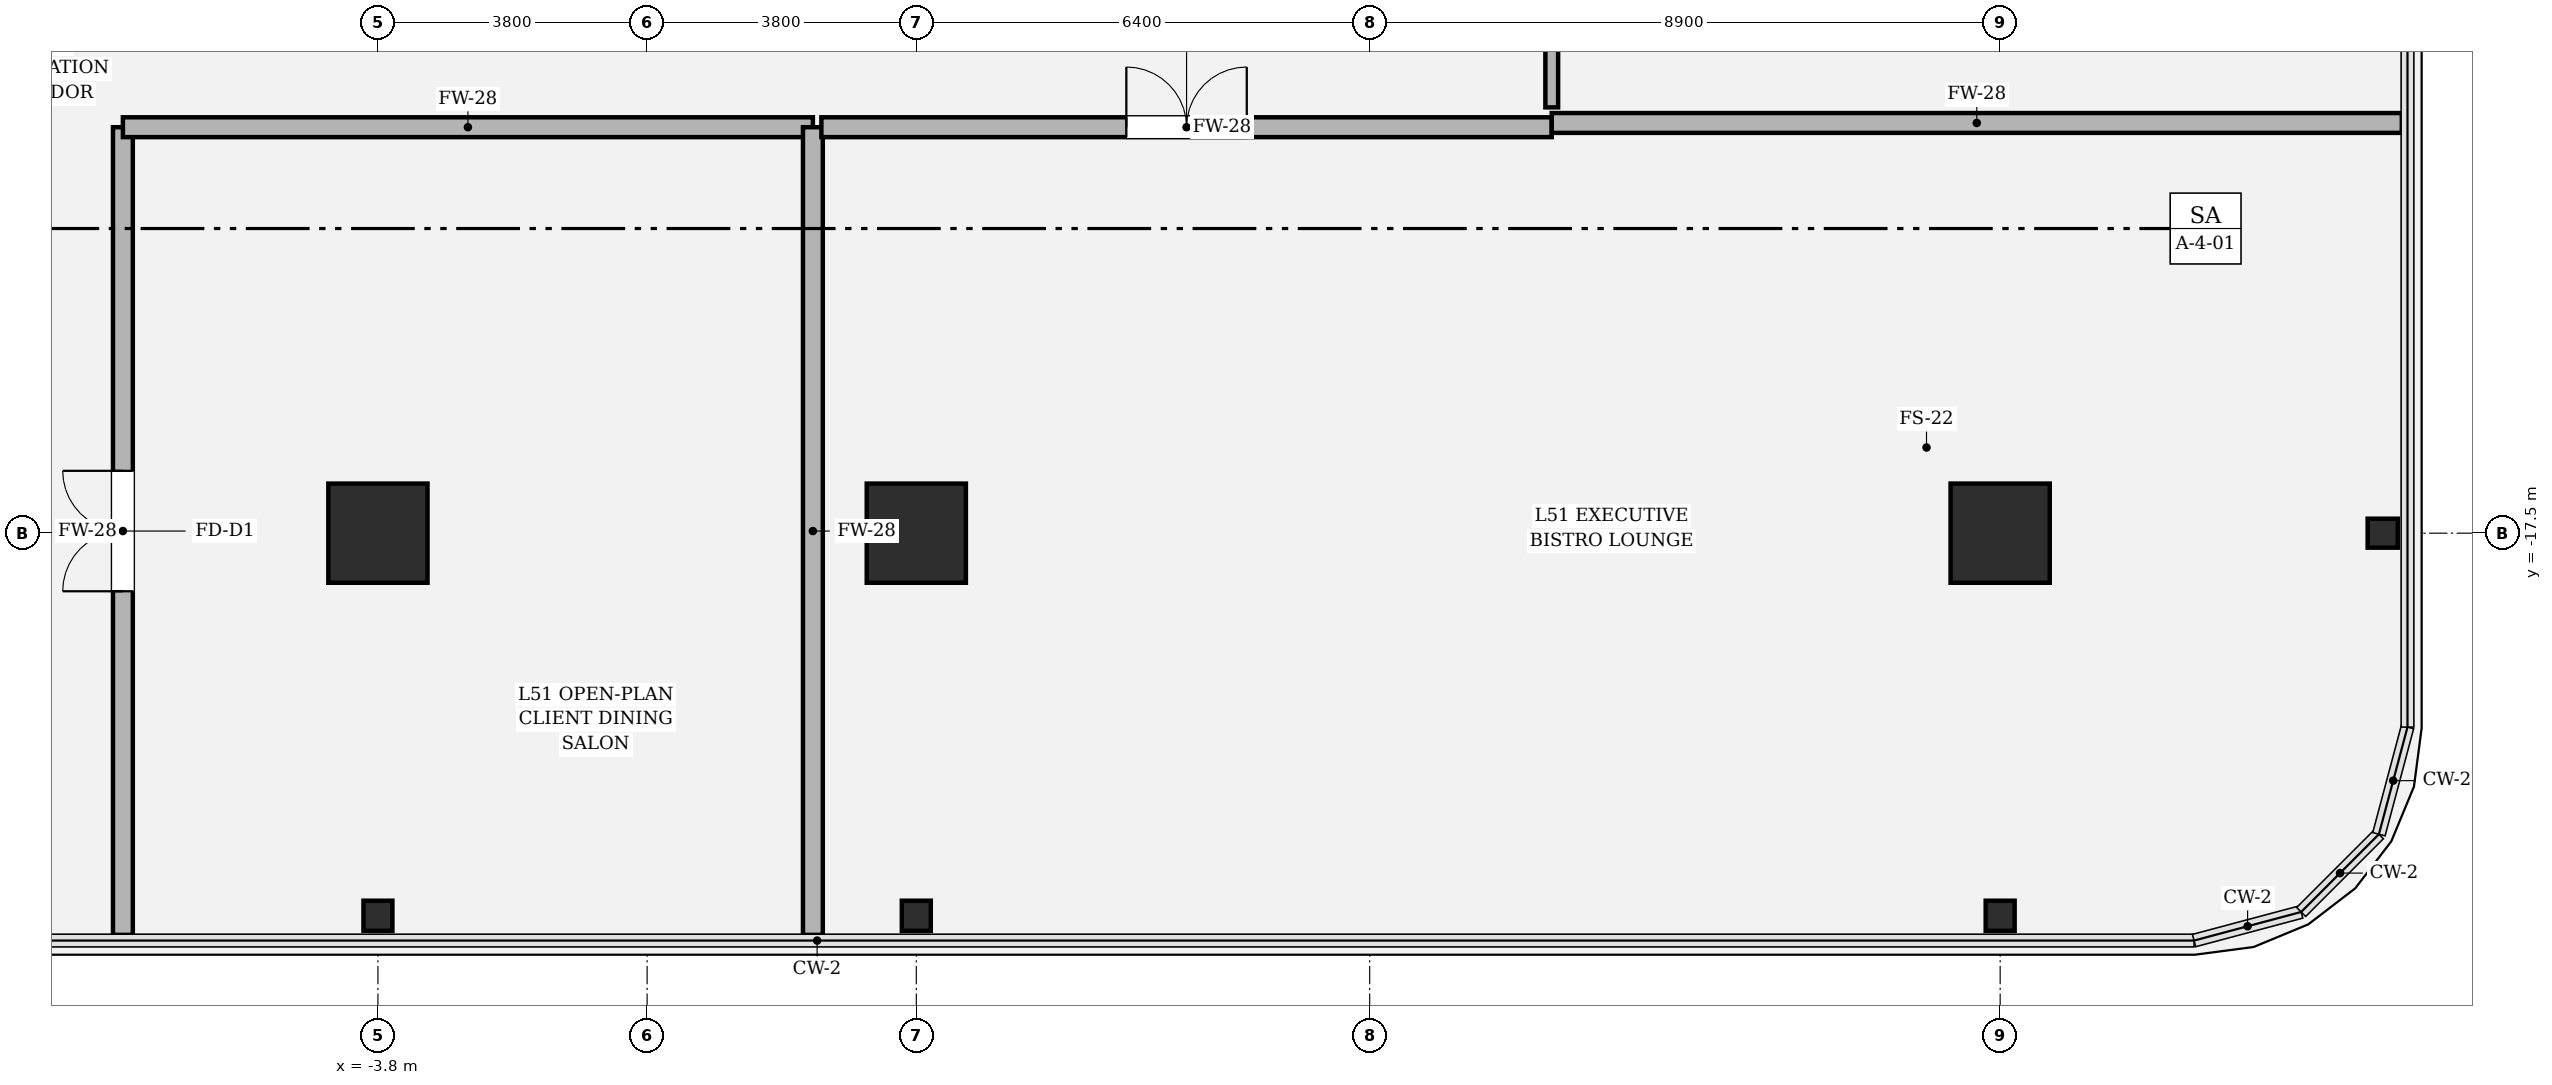
"""IFC4 building model, lengths in metres.
Left out: names, types, materials, properties, quantities, classifications, styles, units other than length and angle.
Written with IfcOpenShell. Run it as: python <this file> out.ifc"""

import sys

from ifc_helpers import new_model, si_unit, direction, frame, frame_2d, origin, origin_2d, place, context, subcontext, project, spatial, rectangle, hollow_rectangle, i_section, extrude, element, fill, save


model = new_model("IFC4")
c1 = context("Model", 3, precision=1e-05, world=origin(), true_north=direction((0.0, 1.0)))
c2 = subcontext(c1, "Body", "Model", "MODEL_VIEW")
j1 = project(units=[si_unit("LENGTHUNIT", "METRE"), si_unit("PLANEANGLEUNIT", "RADIAN")], contexts=[c1])
p1 = place(None, origin())
s1 = spatial("IfcSite", under=j1, at=p1, CompositionType="ELEMENT")
p2 = place(p1, origin())
s2 = spatial("IfcBuilding", under=s1, at=p2, CompositionType="ELEMENT")
p3 = place(p2, frame((0.0, 0.0, 216.75)))
s3 = spatial("IfcBuildingStorey", under=s2, at=p3, CompositionType="ELEMENT", Elevation=216.75)
for number, where, z_axis, x_axis in (
    (1, (-3.8, -17.5, 0.0), (0.0, 0.0, 1.0), (1.0, 0.0, 0.0)),
    (2, (3.8, -17.5, 0.0), (0.0, 0.0, 1.0), (1.0, 0.0, 0.0)),
    (3, (19.1, -17.5, 0.0), (0.0, 0.0, 1.0), (1.0, 0.0, 0.0)),
):
    element("IfcColumn", number, at=place(p3, frame(where, z_axis=z_axis, x_axis=x_axis)), inside=s3, PredefinedType="COLUMN", context=c2, shape_type="SweptSolid", body=[
        extrude(hollow_rectangle(XDim=1.4, YDim=1.4, WallThickness=0.042, at=origin_2d()), origin(), (0.0, 0.0, 1.0), 4.05),
    ])
for number, where, z_axis, x_axis in (
    (4, (-3.8, -22.9, 0.0), (0.0, 0.0, 1.0), (1.0, 0.0, 0.0)),
    (5, (3.8, -22.9, 0.0), (0.0, 0.0, 1.0), (1.0, 0.0, 0.0)),
    (6, (19.1, -22.9, 0.0), (0.0, 0.0, 1.0), (1.0, 0.0, 0.0)),
    (7, (24.5, -17.5, 0.0), (0.0, 0.0, 1.0), (0.0, 1.0, 0.0)),
):
    element("IfcColumn", number, at=place(p3, frame(where, z_axis=z_axis, x_axis=x_axis)), inside=s3, PredefinedType="COLUMN", context=c2, shape_type="SweptSolid", body=[
        extrude(i_section(OverallWidth=0.409, OverallDepth=0.425, WebThickness=0.032, FlangeThickness=0.052, FilletRadius=0.018, at=origin_2d()), origin(), (0.0, 0.0, 1.0), 4.048),
    ])
p4 = place(p3, frame((-7.4, -23.17, 0.0), z_axis=(0.0, 0.0, 1.0), x_axis=(0.0, 1.0, 0.0)))
e8 = element("IfcWall", 8, at=p4, inside=s3, PredefinedType="SOLIDWALL", context=c2, shape_type="SweptSolid", body=[
    extrude(rectangle(XDim=11.4, YDim=0.28, at=frame_2d((5.7, 0.0))), origin(), (0.0, 0.0, 1.0), 2.504),
])
p5 = place(p4, frame((4.85, 0.0, 0.0)))
e9 = element("IfcOpeningElement", 9, at=p5, cuts=e8, PredefinedType="OPENING", context=c2, shape_type="SweptSolid", body=[
    extrude(rectangle(XDim=1.7, YDim=2.3, at=frame_2d((0.85, 1.15))), frame((0.0, 0.15, 0.0), z_axis=(0.0, -1.0, 0.0), x_axis=(1.0, 0.0, 0.0)), (0.0, 0.0, 1.0), 0.3),
])
p6 = place(p3, frame((-7.4, -11.77, 0.0), z_axis=(0.0, 0.0, 1.0), x_axis=(1.0, 0.0, 0.0)))
e10 = element("IfcWall", 10, at=p6, inside=s3, PredefinedType="SOLIDWALL", context=c2, shape_type="SweptSolid", body=[
    extrude(rectangle(XDim=9.74, YDim=0.28, at=frame_2d((4.87, 0.0))), origin(), (0.0, 0.0, 1.0), 2.504),
])
p7 = place(p3, frame((2.34, -11.77, 0.0), z_axis=(0.0, 0.0, 1.0), x_axis=(0.0, -1.0, 0.0)))
e11 = element("IfcWall", 11, at=p7, inside=s3, PredefinedType="SOLIDWALL", context=c2, shape_type="SweptSolid", body=[
    extrude(rectangle(XDim=11.4, YDim=0.28, at=frame_2d((5.7, 0.0))), origin(), (0.0, 0.0, 1.0), 2.504),
])
p8 = place(p3, frame((2.46, -11.77, 0.0), z_axis=(0.0, 0.0, 1.0), x_axis=(1.0, 0.0, 0.0)))
e12 = element("IfcWall", 12, at=p8, inside=s3, PredefinedType="SOLIDWALL", context=c2, shape_type="SweptSolid", body=[
    extrude(rectangle(XDim=10.31, YDim=0.28, at=frame_2d((5.155, 0.0))), origin(), (0.0, 0.0, 1.0), 2.504),
])
p9 = place(p8, frame((4.305, 0.0, 0.0)))
e13 = element("IfcOpeningElement", 13, at=p9, cuts=e12, PredefinedType="OPENING", context=c2, shape_type="SweptSolid", body=[
    extrude(rectangle(XDim=1.7, YDim=2.3, at=frame_2d((0.85, 1.15))), frame((0.0, 0.15, 0.0), z_axis=(0.0, -1.0, 0.0), x_axis=(1.0, 0.0, 0.0)), (0.0, 0.0, 1.0), 0.3),
])
p10 = place(p3, frame((12.77, -11.71, 0.0), z_axis=(0.0, 0.0, 1.0), x_axis=(1.0, 0.0, 0.0)))
e14 = element("IfcWall", 14, at=p10, inside=s3, PredefinedType="SOLIDWALL", context=c2, shape_type="SweptSolid", body=[
    extrude(rectangle(XDim=12.0, YDim=0.28, at=frame_2d((6.0, 0.0))), origin(), (0.0, 0.0, 1.0), 2.504),
])
p11 = place(p3, frame((12.77, -11.49, 0.0), z_axis=(0.0, 0.0, 1.0), x_axis=(0.0, 1.0, 0.0)))
e15 = element("IfcWall", 15, at=p11, inside=s3, PredefinedType="PARTITIONING", context=c2, shape_type="SweptSolid", body=[
    extrude(rectangle(XDim=19.528, YDim=0.18, at=frame_2d((9.764, 0.0))), origin(), (0.0, 0.0, 1.0), 2.504),
])
p12 = place(p11, frame((9.239, 0.0, 0.0)))
e16 = element("IfcOpeningElement", 16, at=p12, cuts=e15, PredefinedType="OPENING", context=c2, shape_type="SweptSolid", body=[
    extrude(rectangle(XDim=1.05, YDim=2.2, at=frame_2d((0.525, 1.1))), frame((0.0, 0.1, 0.0), z_axis=(0.0, -1.0, 0.0), x_axis=(1.0, 0.0, 0.0)), (0.0, 0.0, 1.0), 0.2),
])
p13 = place(p5, origin())
e17 = element("IfcDoor", 17, at=p13, inside=s3, OperationType="DOUBLE_DOOR_SINGLE_SWING", PredefinedType="DOOR", context=c2, shape_type="SweptSolid", body=[
    extrude(rectangle(XDim=1.7, YDim=2.3, at=frame_2d((0.85, 1.15))), frame((0.0, 0.025, 0.0), z_axis=(0.0, -1.0, 0.0), x_axis=(1.0, 0.0, 0.0)), (0.0, 0.0, 1.0), 0.05),
])
fill(e9, e17)
p14 = place(p9, origin())
e18 = element("IfcDoor", 18, at=p14, inside=s3, OperationType="DOUBLE_DOOR_SINGLE_SWING", PredefinedType="DOOR", context=c2, shape_type="SweptSolid", body=[
    extrude(rectangle(XDim=1.7, YDim=2.3, at=frame_2d((0.85, 1.15))), frame((0.0, 0.025, 0.0), z_axis=(0.0, -1.0, 0.0), x_axis=(1.0, 0.0, 0.0)), (0.0, 0.0, 1.0), 0.05),
])
fill(e13, e18)
save(model, sys.argv[1])
